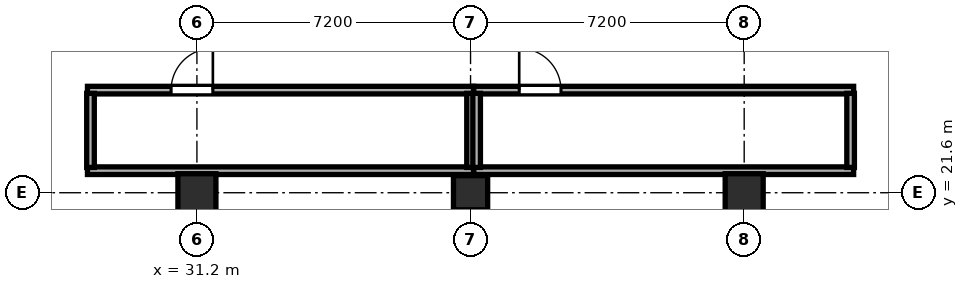
"""IFC4 building model, lengths in metres.
Left out: names, types, materials, properties, quantities, classifications, styles, units other than length and angle.
Written with IfcOpenShell. Run it as: python <this file> out.ifc"""

import sys

from ifc_helpers import new_model, si_unit, direction, frame, frame_2d, origin, origin_2d, place, context, subcontext, project, spatial, rectangle, hollow_rectangle, extrude, element, fill, save


model = new_model("IFC4")
c1 = context("Model", 3, precision=1e-05, world=origin(), true_north=direction((0.0, 1.0)))
c2 = subcontext(c1, "Body", "Model", "MODEL_VIEW")
j1 = project(units=[si_unit("LENGTHUNIT", "METRE"), si_unit("PLANEANGLEUNIT", "RADIAN")], contexts=[c1])
p1 = place(None, origin())
s1 = spatial("IfcSite", under=j1, at=p1, CompositionType="ELEMENT")
p2 = place(p1, origin())
s2 = spatial("IfcBuilding", under=s1, at=p2, CompositionType="ELEMENT")
p3 = place(p2, frame((0.0, 0.0, 136.4)))
s3 = spatial("IfcBuildingStorey", under=s2, at=p3, CompositionType="ELEMENT", Elevation=136.4)
for number, where, z_axis, x_axis in (
    (1, (31.2, 21.6, 0.0), (0.0, 0.0, 1.0), (1.0, 0.0, 0.0)),
    (2, (45.6, 21.6, 0.0), (0.0, 0.0, 1.0), (1.0, 0.0, 0.0)),
):
    element("IfcColumn", number, at=place(p3, frame(where, z_axis=z_axis, x_axis=x_axis)), inside=s3, PredefinedType="COLUMN", context=c2, shape_type="SweptSolid", body=[
        extrude(hollow_rectangle(XDim=1.0, YDim=1.0, WallThickness=0.038, at=origin_2d()), origin(), (0.0, 0.0, 1.0), 4.6),
    ])
p4 = place(p3, frame((38.4, 21.6, 0.0), z_axis=(0.0, 0.0, 1.0), x_axis=(1.0, 0.0, 0.0)))
e3 = element("IfcColumn", 3, at=p4, inside=s3, PredefinedType="COLUMN", context=c2, shape_type="SweptSolid", body=[
    extrude(hollow_rectangle(XDim=0.9, YDim=0.9, WallThickness=0.034, at=origin_2d()), origin(), (0.0, 0.0, 1.0), 4.6),
])
p5 = place(p3, frame((24.492, 21.601, 0.0), z_axis=(0.0, 0.0, 1.0), x_axis=(0.970148945932, -0.242509840432, 0.0)))
e4 = element("IfcWall", 4, at=p5, inside=s3, PredefinedType="PARAPET", context=c2, shape_type="SweptSolid", body=[
    extrude(rectangle(XDim=4.456, YDim=0.16, at=frame_2d((2.228, 0.0))), origin(), (0.0, 0.0, 1.0), 1.15),
])
p6 = place(p3, frame((47.985, 20.52, 0.0), z_axis=(0.0, 0.0, 1.0), x_axis=(0.970152168055, 0.242496950122, 0.0)))
e5 = element("IfcWall", 5, at=p6, inside=s3, PredefinedType="PARAPET", context=c2, shape_type="SweptSolid", body=[
    extrude(rectangle(XDim=4.456, YDim=0.16, at=frame_2d((2.228, 0.0))), origin(), (0.0, 0.0, 1.0), 1.15),
])
p7 = place(p3, frame((28.32, 24.3, 0.0), z_axis=(0.0, 0.0, 1.0), x_axis=(1.0, 0.0, 0.0)))
e6 = element("IfcWall", 6, at=p7, inside=s3, PredefinedType="SOLIDWALL", context=c2, shape_type="SweptSolid", body=[
    extrude(rectangle(XDim=10.16, YDim=0.2, at=frame_2d((5.08, 0.0))), origin(), (0.0, 0.0, 1.0), 4.4),
])
p8 = place(p7, frame((3.3, 0.0, 0.0), z_axis=(0.0, 0.0, 1.0), x_axis=(-1.0, 0.0, 0.0)))
e7 = element("IfcOpeningElement", 7, at=p8, cuts=e6, PredefinedType="OPENING", context=c2, shape_type="SweptSolid", body=[
    extrude(rectangle(XDim=1.1, YDim=2.15, at=frame_2d((0.55, 1.075))), frame((0.0, 0.11, 0.0), z_axis=(0.0, -1.0, 0.0), x_axis=(1.0, 0.0, 0.0)), (0.0, 0.0, 1.0), 0.22),
])
p9 = place(p3, frame((28.32, 22.18, 0.0), z_axis=(0.0, 0.0, 1.0), x_axis=(1.0, 0.0, 0.0)))
e8 = element("IfcWall", 8, at=p9, inside=s3, PredefinedType="SOLIDWALL", context=c2, shape_type="SweptSolid", body=[
    extrude(rectangle(XDim=10.16, YDim=0.2, at=frame_2d((5.08, 0.0))), origin(), (0.0, 0.0, 1.0), 4.4),
])
p10 = place(p3, frame((28.4, 22.265, 0.0), z_axis=(0.0, 0.0, 1.0), x_axis=(0.0, 1.0, 0.0)))
e9 = element("IfcWall", 9, at=p10, inside=s3, PredefinedType="SOLIDWALL", context=c2, shape_type="SweptSolid", body=[
    extrude(rectangle(XDim=1.95, YDim=0.2, at=frame_2d((0.975, 0.0))), origin(), (0.0, 0.0, 1.0), 4.4),
])
p11 = place(p3, frame((38.4, 22.265, 0.0), z_axis=(0.0, 0.0, 1.0), x_axis=(0.0, 1.0, 0.0)))
e10 = element("IfcWall", 10, at=p11, inside=s3, PredefinedType="SOLIDWALL", context=c2, shape_type="SweptSolid", body=[
    extrude(rectangle(XDim=1.95, YDim=0.2, at=frame_2d((0.975, 0.0))), origin(), (0.0, 0.0, 1.0), 3.885),
])
p12 = place(p3, frame((38.485, 24.3, 0.0), z_axis=(0.0, 0.0, 1.0), x_axis=(1.0, 0.0, 0.0)))
e11 = element("IfcWall", 11, at=p12, inside=s3, PredefinedType="SOLIDWALL", context=c2, shape_type="SweptSolid", body=[
    extrude(rectangle(XDim=9.995, YDim=0.2, at=frame_2d((4.998, 0.0))), origin(), (0.0, 0.0, 1.0), 4.4),
])
p13 = place(p12, frame((2.295, 0.0, 0.0), z_axis=(0.0, 0.0, 1.0), x_axis=(-1.0, 0.0, 0.0)))
e12 = element("IfcOpeningElement", 12, at=p13, cuts=e11, PredefinedType="OPENING", context=c2, shape_type="SweptSolid", body=[
    extrude(rectangle(XDim=1.1, YDim=2.15, at=frame_2d((0.55, 1.075))), frame((0.0, 0.11, 0.0), z_axis=(0.0, -1.0, 0.0), x_axis=(1.0, 0.0, 0.0)), (0.0, 0.0, 1.0), 0.22),
])
p14 = place(p3, frame((38.485, 22.18, 0.0), z_axis=(0.0, 0.0, 1.0), x_axis=(1.0, 0.0, 0.0)))
e13 = element("IfcWall", 13, at=p14, inside=s3, PredefinedType="SOLIDWALL", context=c2, shape_type="SweptSolid", body=[
    extrude(rectangle(XDim=9.995, YDim=0.2, at=frame_2d((4.998, 0.0))), origin(), (0.0, 0.0, 1.0), 4.4),
])
p15 = place(p3, frame((38.56, 22.265, 0.0), z_axis=(0.0, 0.0, 1.0), x_axis=(0.0, 1.0, 0.0)))
e14 = element("IfcWall", 14, at=p15, inside=s3, PredefinedType="SOLIDWALL", context=c2, shape_type="SweptSolid", body=[
    extrude(rectangle(XDim=1.95, YDim=0.2, at=frame_2d((0.975, 0.0))), origin(), (0.0, 0.0, 1.0), 3.885),
])
p16 = place(p3, frame((48.4, 22.265, 0.0), z_axis=(0.0, 0.0, 1.0), x_axis=(0.0, 1.0, 0.0)))
e15 = element("IfcWall", 15, at=p16, inside=s3, PredefinedType="SOLIDWALL", context=c2, shape_type="SweptSolid", body=[
    extrude(rectangle(XDim=1.95, YDim=0.2, at=frame_2d((0.975, 0.0))), origin(), (0.0, 0.0, 1.0), 4.4),
])
p17 = place(p8, origin())
e16 = element("IfcDoor", 16, at=p17, inside=s3, OperationType="SINGLE_SWING_LEFT", PredefinedType="DOOR", context=c2, shape_type="SweptSolid", body=[
    extrude(rectangle(XDim=1.1, YDim=2.15, at=frame_2d((0.55, 1.075))), frame((0.0, 0.025, 0.0), z_axis=(0.0, -1.0, 0.0), x_axis=(1.0, 0.0, 0.0)), (0.0, 0.0, 1.0), 0.05),
])
fill(e7, e16)
p18 = place(p13, origin())
e17 = element("IfcDoor", 17, at=p18, inside=s3, OperationType="SINGLE_SWING_RIGHT", PredefinedType="DOOR", context=c2, shape_type="SweptSolid", body=[
    extrude(rectangle(XDim=1.1, YDim=2.15, at=frame_2d((0.55, 1.075))), frame((0.0, 0.025, 0.0), z_axis=(0.0, -1.0, 0.0), x_axis=(1.0, 0.0, 0.0)), (0.0, 0.0, 1.0), 0.05),
])
fill(e12, e17)
save(model, sys.argv[1])
